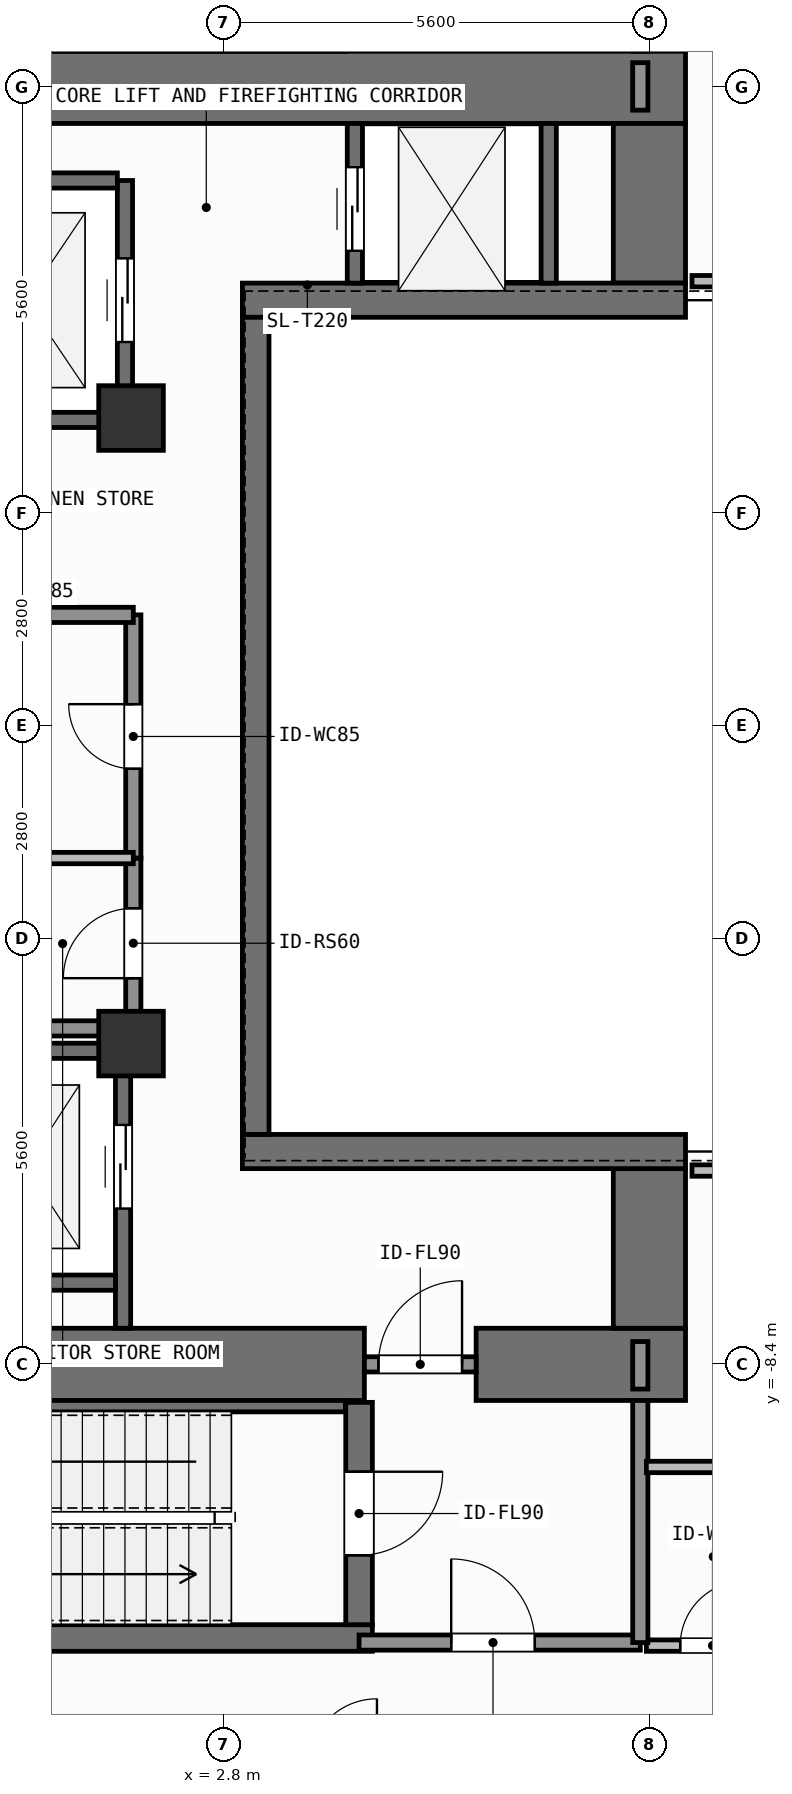
"""IFC4 building model, lengths in metres.
Left out: names, types, materials, properties, quantities, classifications, styles, units other than length and angle.
Written with IfcOpenShell. Run it as: python <this file> out.ifc"""

import sys

from ifc_helpers import new_model, si_unit, direction, frame, frame_2d, origin, origin_2d, place, context, subcontext, project, spatial, rectangle, extrude, element, fill, save


model = new_model("IFC4")
c1 = context("Model", 3, precision=1e-05, world=origin(), true_north=direction((0.0, 1.0)))
c2 = subcontext(c1, "Body", "Model", "MODEL_VIEW")
j1 = project(units=[si_unit("LENGTHUNIT", "METRE"), si_unit("PLANEANGLEUNIT", "RADIAN")], contexts=[c1])
p1 = place(None, origin())
s1 = spatial("IfcSite", under=j1, at=p1, CompositionType="ELEMENT")
p2 = place(p1, origin())
s2 = spatial("IfcBuilding", under=s1, at=p2, CompositionType="ELEMENT")
p3 = place(p2, frame((0.0, 0.0, 125.1)))
s3 = spatial("IfcBuildingStorey", under=s2, at=p3, CompositionType="ELEMENT", Elevation=125.1)
p4 = place(p3, frame((-2.62, -8.4, 0.0), z_axis=(0.0, 0.0, 1.0), x_axis=(1.0, 0.0, 0.0)))
e1 = element("IfcWall", 1, at=p4, inside=s3, PredefinedType="SHEAR", context=c2, shape_type="SweptSolid", body=[
    extrude(rectangle(XDim=7.27, YDim=0.95, at=frame_2d((3.635, 0.0))), origin(), (0.0, 0.0, 1.0), 3.9),
])
p5 = place(p3, frame((6.12, -8.4, 0.0), z_axis=(0.0, 0.0, 1.0), x_axis=(1.0, 0.0, 0.0)))
e2 = element("IfcWall", 2, at=p5, inside=s3, PredefinedType="SHEAR", context=c2, shape_type="SweptSolid", body=[
    extrude(rectangle(XDim=2.755, YDim=0.95, at=frame_2d((1.377, 0.0))), origin(), (0.0, 0.0, 1.0), 3.9),
])
p6 = place(p3, frame((-7.55, 8.4, 0.0), z_axis=(0.0, 0.0, 1.0), x_axis=(1.0, 0.0, 0.0)))
e3 = element("IfcWall", 3, at=p6, inside=s3, PredefinedType="SHEAR", context=c2, shape_type="SweptSolid", body=[
    extrude(rectangle(XDim=16.425, YDim=0.95, at=frame_2d((8.212, 0.0))), origin(), (0.0, 0.0, 1.0), 3.9),
])
for number, where, z_axis, x_axis in (
    (4, (8.4, -7.925, 0.0), (0.0, 0.0, 1.0), (0.0, 1.0, 0.0)),
    (5, (8.4, 5.825, 0.0), (0.0, 0.0, 1.0), (0.0, 1.0, 0.0)),
):
    element("IfcWall", number, at=place(p3, frame(where, z_axis=z_axis, x_axis=x_axis)), inside=s3, PredefinedType="SHEAR", context=c2, shape_type="SweptSolid", body=[
        extrude(rectangle(XDim=2.1, YDim=0.95, at=frame_2d((1.05, 0.0))), origin(), (0.0, 0.0, 1.0), 3.9),
    ])
for number, where, z_axis, x_axis in (
    (6, (3.045, -5.6, 0.0), (0.0, 0.0, 1.0), (1.0, 0.0, 0.0)),
    (7, (3.045, 5.6, 0.0), (0.0, 0.0, 1.0), (1.0, 0.0, 0.0)),
):
    element("IfcWall", number, at=place(p3, frame(where, z_axis=z_axis, x_axis=x_axis)), inside=s3, PredefinedType="SHEAR", context=c2, shape_type="SweptSolid", body=[
        extrude(rectangle(XDim=5.83, YDim=0.45, at=frame_2d((2.915, 0.0))), origin(), (0.0, 0.0, 1.0), 3.9),
    ])
p7 = place(p3, frame((3.22, -5.375, 0.0), z_axis=(0.0, 0.0, 1.0), x_axis=(0.0, 1.0, 0.0)))
e8 = element("IfcWall", 8, at=p7, inside=s3, PredefinedType="SHEAR", context=c2, shape_type="SweptSolid", body=[
    extrude(rectangle(XDim=10.75, YDim=0.35, at=frame_2d((5.375, 0.0))), origin(), (0.0, 0.0, 1.0), 3.9),
])
p8 = place(p3, frame((-2.555, -12.0, 0.0), z_axis=(0.0, 0.0, 1.0), x_axis=(1.0, 0.0, 0.0)))
e9 = element("IfcWall", 9, at=p8, inside=s3, PredefinedType="SHEAR", context=c2, shape_type="SweptSolid", body=[
    extrude(rectangle(XDim=7.31, YDim=0.35, at=frame_2d((3.655, 0.0))), origin(), (0.0, 0.0, 1.0), 3.9),
])
p9 = place(p3, frame((-2.2, -8.95, 0.0), z_axis=(0.0, 0.0, 1.0), x_axis=(1.0, 0.0, 0.0)))
e10 = element("IfcWall", 10, at=p9, inside=s3, PredefinedType="SHEAR", context=c2, shape_type="SweptSolid", body=[
    extrude(rectangle(XDim=6.6, YDim=0.15, at=frame_2d((3.3, 0.0))), origin(), (0.0, 0.0, 1.0), 3.9),
])
p10 = place(p3, frame((4.58, -8.9, 0.0), z_axis=(0.0, 0.0, 1.0), x_axis=(0.0, -1.0, 0.0)))
e11 = element("IfcWall", 11, at=p10, inside=s3, PredefinedType="SHEAR", context=c2, shape_type="SweptSolid", body=[
    extrude(rectangle(XDim=2.925, YDim=0.35, at=frame_2d((1.462, 0.0))), origin(), (0.0, 0.0, 1.0), 3.9),
])
p11 = place(p10, frame((0.913, 0.0, 0.0)))
e12 = element("IfcOpeningElement", 12, at=p11, cuts=e11, PredefinedType="OPENING", context=c2, shape_type="SweptSolid", body=[
    extrude(rectangle(XDim=1.1, YDim=2.15, at=frame_2d((0.55, 1.075))), frame((0.0, 0.185, 0.0), z_axis=(0.0, -1.0, 0.0), x_axis=(1.0, 0.0, 0.0)), (0.0, 0.0, 1.0), 0.37),
])
for number, where, z_axis, x_axis in (
    (13, (1.58, -4.18, 0.0), (0.0, 0.0, 1.0), (1.0, 0.0, 0.0)),
    (14, (1.58, 4.05, 0.0), (0.0, 0.0, 1.0), (1.0, 0.0, 0.0)),
):
    element("IfcColumn", number, at=place(p3, frame(where, z_axis=z_axis, x_axis=x_axis)), inside=s3, PredefinedType="COLUMN", context=c2, shape_type="SweptSolid", body=[
        extrude(rectangle(XDim=0.85, YDim=0.85, at=origin_2d()), origin(), (0.0, 0.0, 1.0), 3.9),
    ])
p12 = place(p3, frame((1.5, 4.025, 0.0), z_axis=(0.0, 0.0, 1.0), x_axis=(0.0, 1.0, 0.0)))
e15 = element("IfcWall", 15, at=p12, inside=s3, PredefinedType="SHEAR", context=c2, shape_type="SweptSolid", body=[
    extrude(rectangle(XDim=3.15, YDim=0.2, at=frame_2d((1.575, 0.0))), origin(), (0.0, 0.0, 1.0), 3.68),
])
p13 = place(p12, frame((1.025, 0.0, 0.0)))
e16 = element("IfcOpeningElement", 16, at=p13, cuts=e15, PredefinedType="OPENING", context=c2, shape_type="SweptSolid", body=[
    extrude(rectangle(XDim=1.1, YDim=2.2, at=frame_2d((0.55, 1.1))), frame((0.0, 0.11, 0.0), z_axis=(0.0, -1.0, 0.0), x_axis=(1.0, 0.0, 0.0)), (0.0, 0.0, 1.0), 0.22),
])
for number, where, z_axis, x_axis in (
    (17, (-1.0, 4.025, 0.0), (0.0, 0.0, 1.0), (1.0, 0.0, 0.0)),
    (18, (-1.0, 7.175, 0.0), (0.0, 0.0, 1.0), (1.0, 0.0, 0.0)),
):
    element("IfcWall", number, at=place(p3, frame(where, z_axis=z_axis, x_axis=x_axis)), inside=s3, PredefinedType="SHEAR", context=c2, shape_type="SweptSolid", body=[
        extrude(rectangle(XDim=2.4, YDim=0.2, at=frame_2d((1.2, 0.0))), origin(), (0.0, 0.0, 1.0), 3.68),
    ])
p14 = place(p3, frame((1.475, -7.925, 0.0), z_axis=(0.0, 0.0, 1.0), x_axis=(0.0, 1.0, 0.0)))
e19 = element("IfcWall", 19, at=p14, inside=s3, PredefinedType="SHEAR", context=c2, shape_type="SweptSolid", body=[
    extrude(rectangle(XDim=3.65, YDim=0.2, at=frame_2d((1.825, 0.0))), origin(), (0.0, 0.0, 1.0), 3.68),
])
p15 = place(p14, frame((1.575, 0.0, 0.0)))
e20 = element("IfcOpeningElement", 20, at=p15, cuts=e19, PredefinedType="OPENING", context=c2, shape_type="SweptSolid", body=[
    extrude(rectangle(XDim=1.1, YDim=2.2, at=frame_2d((0.55, 1.1))), frame((0.0, 0.11, 0.0), z_axis=(0.0, -1.0, 0.0), x_axis=(1.0, 0.0, 0.0)), (0.0, 0.0, 1.0), 0.22),
])
for number, where, z_axis, x_axis in (
    (21, (-0.975, -7.325, 0.0), (0.0, 0.0, 1.0), (1.0, 0.0, 0.0)),
    (22, (-0.975, -4.275, 0.0), (0.0, 0.0, 1.0), (1.0, 0.0, 0.0)),
):
    element("IfcWall", number, at=place(p3, frame(where, z_axis=z_axis, x_axis=x_axis)), inside=s3, PredefinedType="SHEAR", context=c2, shape_type="SweptSolid", body=[
        extrude(rectangle(XDim=2.35, YDim=0.2, at=frame_2d((1.175, 0.0))), origin(), (0.0, 0.0, 1.0), 3.68),
    ])
p16 = place(p3, frame((4.525, 5.825, 0.0), z_axis=(0.0, 0.0, 1.0), x_axis=(0.0, 1.0, 0.0)))
e23 = element("IfcWall", 23, at=p16, inside=s3, PredefinedType="SHEAR", context=c2, shape_type="SweptSolid", body=[
    extrude(rectangle(XDim=2.1, YDim=0.2, at=frame_2d((1.05, 0.0))), origin(), (0.0, 0.0, 1.0), 3.68),
])
p17 = place(p16, frame((0.425, 0.0, 0.0)))
e24 = element("IfcOpeningElement", 24, at=p17, cuts=e23, PredefinedType="OPENING", context=c2, shape_type="SweptSolid", body=[
    extrude(rectangle(XDim=1.1, YDim=2.2, at=frame_2d((0.55, 1.1))), frame((0.0, 0.11, 0.0), z_axis=(0.0, -1.0, 0.0), x_axis=(1.0, 0.0, 0.0)), (0.0, 0.0, 1.0), 0.22),
])
p18 = place(p3, frame((7.075, 5.825, 0.0), z_axis=(0.0, 0.0, 1.0), x_axis=(0.0, 1.0, 0.0)))
e25 = element("IfcWall", 25, at=p18, inside=s3, PredefinedType="SHEAR", context=c2, shape_type="SweptSolid", body=[
    extrude(rectangle(XDim=2.1, YDim=0.2, at=frame_2d((1.05, 0.0))), origin(), (0.0, 0.0, 1.0), 3.68),
])
p19 = place(p3, frame((4.58, -12.06, 0.0), z_axis=(0.0, 0.0, 1.0), x_axis=(1.0, 0.0, 0.0)))
e26 = element("IfcWall", 26, at=p19, inside=s3, PredefinedType="SOLIDWALL", context=c2, shape_type="SweptSolid", body=[
    extrude(rectangle(XDim=3.7, YDim=0.2, at=frame_2d((1.85, 0.0))), origin(), (0.0, 0.0, 1.0), 3.68),
])
p20 = place(p19, frame((1.212, 0.0, 0.0)))
e27 = element("IfcOpeningElement", 27, at=p20, cuts=e26, PredefinedType="OPENING", context=c2, shape_type="SweptSolid", body=[
    extrude(rectangle(XDim=1.1, YDim=2.15, at=frame_2d((0.55, 1.075))), frame((0.0, 0.11, 0.0), z_axis=(0.0, -1.0, 0.0), x_axis=(1.0, 0.0, 0.0)), (0.0, 0.0, 1.0), 0.22),
])
p21 = place(p3, frame((4.65, -8.4, 0.0), z_axis=(0.0, 0.0, 1.0), x_axis=(1.0, 0.0, 0.0)))
e28 = element("IfcWall", 28, at=p21, inside=s3, PredefinedType="SOLIDWALL", context=c2, shape_type="SweptSolid", body=[
    extrude(rectangle(XDim=1.47, YDim=0.2, at=frame_2d((0.735, 0.0))), origin(), (0.0, 0.0, 1.0), 2.72),
])
p22 = place(p21, frame((0.185, 0.0, 0.0)))
e29 = element("IfcOpeningElement", 29, at=p22, cuts=e28, PredefinedType="OPENING", context=c2, shape_type="SweptSolid", body=[
    extrude(rectangle(XDim=1.1, YDim=2.15, at=frame_2d((0.55, 1.075))), frame((0.0, 0.11, 0.0), z_axis=(0.0, -1.0, 0.0), x_axis=(1.0, 0.0, 0.0)), (0.0, 0.0, 1.0), 0.22),
])
p23 = place(p3, frame((1.61, -3.98, 0.0), z_axis=(0.0, 0.0, 1.0), x_axis=(0.0, 1.0, 0.0)))
e30 = element("IfcWall", 30, at=p23, inside=s3, PredefinedType="SOLIDWALL", context=c2, shape_type="SweptSolid", body=[
    extrude(rectangle(XDim=2.241, YDim=0.2, at=frame_2d((1.121, 0.0))), origin(), (0.0, 0.0, 1.0), 3.68),
])
p24 = place(p23, frame((0.66, 0.0, 0.0)))
e31 = element("IfcOpeningElement", 31, at=p24, cuts=e30, PredefinedType="OPENING", context=c2, shape_type="SweptSolid", body=[
    extrude(rectangle(XDim=0.92, YDim=2.1, at=frame_2d((0.46, 1.05))), frame((0.0, 0.11, 0.0), z_axis=(0.0, -1.0, 0.0), x_axis=(1.0, 0.0, 0.0)), (0.0, 0.0, 1.0), 0.22),
])
p25 = place(p3, frame((1.61, -1.739, 0.0), z_axis=(0.0, 0.0, 1.0), x_axis=(0.0, 1.0, 0.0)))
e32 = element("IfcWall", 32, at=p25, inside=s3, PredefinedType="SOLIDWALL", context=c2, shape_type="SweptSolid", body=[
    extrude(rectangle(XDim=3.199, YDim=0.2, at=frame_2d((1.6, 0.0))), origin(), (0.0, 0.0, 1.0), 3.68),
])
p26 = place(p25, frame((1.175, 0.0, 0.0)))
e33 = element("IfcOpeningElement", 33, at=p26, cuts=e32, PredefinedType="OPENING", context=c2, shape_type="SweptSolid", body=[
    extrude(rectangle(XDim=0.85, YDim=2.1, at=frame_2d((0.425, 1.05))), frame((0.0, 0.11, 0.0), z_axis=(0.0, -1.0, 0.0), x_axis=(1.0, 0.0, 0.0)), (0.0, 0.0, 1.0), 0.22),
])
p27 = place(p3, frame((8.36, -12.1, 0.0), z_axis=(0.0, 0.0, 1.0), x_axis=(1.0, 0.0, 0.0)))
e34 = element("IfcWall", 34, at=p27, inside=s3, PredefinedType="PARTITIONING", context=c2, shape_type="SweptSolid", body=[
    extrude(rectangle(XDim=1.74, YDim=0.15, at=frame_2d((0.87, 0.0))), origin(), (0.0, 0.0, 1.0), 3.68),
])
p28 = place(p27, frame((0.445, 0.0, 0.0)))
e35 = element("IfcOpeningElement", 35, at=p28, cuts=e34, PredefinedType="OPENING", context=c2, shape_type="SweptSolid", body=[
    extrude(rectangle(XDim=0.85, YDim=2.1, at=frame_2d((0.425, 1.05))), frame((0.0, 0.085, 0.0), z_axis=(0.0, -1.0, 0.0), x_axis=(1.0, 0.0, 0.0)), (0.0, 0.0, 1.0), 0.17),
])
p29 = place(p3, frame((8.28, -12.06, 0.0), z_axis=(0.0, 0.0, 1.0), x_axis=(0.0, 1.0, 0.0)))
e36 = element("IfcWall", 36, at=p29, inside=s3, PredefinedType="SOLIDWALL", context=c2, shape_type="SweptSolid", body=[
    extrude(rectangle(XDim=3.185, YDim=0.2, at=frame_2d((1.593, 0.0))), origin(), (0.0, 0.0, 1.0), 3.68),
])
for number, where, z_axis, x_axis in (
    (37, (-1.58, -3.98, 0.0), (0.0, 0.0, 1.0), (1.0, 0.0, 0.0)),
    (38, (-1.58, 1.46, 0.0), (0.0, 0.0, 1.0), (1.0, 0.0, 0.0)),
):
    element("IfcWall", number, at=place(p3, frame(where, z_axis=z_axis, x_axis=x_axis)), inside=s3, PredefinedType="SOLIDWALL", context=c2, shape_type="SweptSolid", body=[
        extrude(rectangle(XDim=3.19, YDim=0.2, at=frame_2d((1.595, 0.0))), origin(), (0.0, 0.0, 1.0), 3.68),
    ])
p30 = place(p3, frame((-1.58, -1.739, 0.0), z_axis=(0.0, 0.0, 1.0), x_axis=(1.0, 0.0, 0.0)))
e39 = element("IfcWall", 39, at=p30, inside=s3, PredefinedType="PARTITIONING", context=c2, shape_type="SweptSolid", body=[
    extrude(rectangle(XDim=3.19, YDim=0.15, at=frame_2d((1.595, 0.0))), origin(), (0.0, 0.0, 1.0), 3.68),
])
p31 = place(p3, frame((8.28, -8.725, 0.0), z_axis=(0.0, 0.0, 1.0), x_axis=(0.0, 1.0, 0.0)))
e40 = element("IfcWall", 40, at=p31, inside=s3, PredefinedType="SOLIDWALL", context=c2, shape_type="SweptSolid", body=[
    extrude(rectangle(XDim=0.625, YDim=0.2, at=frame_2d((0.312, 0.0))), origin(), (0.0, 0.0, 1.0), 3.68),
])
p32 = place(p3, frame((8.36, -9.75, 0.0), z_axis=(0.0, 0.0, 1.0), x_axis=(1.0, 0.0, 0.0)))
e41 = element("IfcWall", 41, at=p32, inside=s3, PredefinedType="PARTITIONING", context=c2, shape_type="SweptSolid", body=[
    extrude(rectangle(XDim=1.74, YDim=0.15, at=frame_2d((0.87, 0.0))), origin(), (0.0, 0.0, 1.0), 3.68),
])
p33 = place(p3, frame((8.96, -5.85, 0.0), z_axis=(0.0, 0.0, 1.0), x_axis=(1.0, 0.0, 0.0)))
e42 = element("IfcWall", 42, at=p33, inside=s3, PredefinedType="PARTITIONING", context=c2, shape_type="SweptSolid", body=[
    extrude(rectangle(XDim=6.62, YDim=0.15, at=frame_2d((3.31, 0.0))), origin(), (0.0, 0.0, 1.0), 3.68),
])
p34 = place(p3, frame((8.28, 8.1, 0.0), z_axis=(0.0, 0.0, 1.0), x_axis=(0.0, 1.0, 0.0)))
e43 = element("IfcWall", 43, at=p34, inside=s3, PredefinedType="SOLIDWALL", context=c2, shape_type="SweptSolid", body=[
    extrude(rectangle(XDim=0.625, YDim=0.2, at=frame_2d((0.312, 0.0))), origin(), (0.0, 0.0, 1.0), 3.68),
])
p35 = place(p3, frame((8.96, 5.85, 0.0), z_axis=(0.0, 0.0, 1.0), x_axis=(1.0, 0.0, 0.0)))
e44 = element("IfcWall", 44, at=p35, inside=s3, PredefinedType="PARTITIONING", context=c2, shape_type="SweptSolid", body=[
    extrude(rectangle(XDim=6.62, YDim=0.15, at=frame_2d((3.31, 0.0))), origin(), (0.0, 0.0, 1.0), 3.68),
])
p36 = place(p13, origin())
e45 = element("IfcDoor", 45, at=p36, inside=s3, OperationType="SLIDING_TO_LEFT", PredefinedType="DOOR", context=c2, shape_type="SweptSolid", body=[
    extrude(rectangle(XDim=1.1, YDim=2.2, at=frame_2d((0.55, 1.1))), frame((0.0, 0.025, 0.0), z_axis=(0.0, -1.0, 0.0), x_axis=(1.0, 0.0, 0.0)), (0.0, 0.0, 1.0), 0.05),
])
fill(e16, e45)
p37 = place(p15, origin())
e46 = element("IfcDoor", 46, at=p37, inside=s3, OperationType="SLIDING_TO_LEFT", PredefinedType="DOOR", context=c2, shape_type="SweptSolid", body=[
    extrude(rectangle(XDim=1.1, YDim=2.2, at=frame_2d((0.55, 1.1))), frame((0.0, 0.025, 0.0), z_axis=(0.0, -1.0, 0.0), x_axis=(1.0, 0.0, 0.0)), (0.0, 0.0, 1.0), 0.05),
])
fill(e20, e46)
p38 = place(p17, origin())
e47 = element("IfcDoor", 47, at=p38, inside=s3, OperationType="SLIDING_TO_LEFT", PredefinedType="DOOR", context=c2, shape_type="SweptSolid", body=[
    extrude(rectangle(XDim=1.1, YDim=2.2, at=frame_2d((0.55, 1.1))), frame((0.0, 0.025, 0.0), z_axis=(0.0, -1.0, 0.0), x_axis=(1.0, 0.0, 0.0)), (0.0, 0.0, 1.0), 0.05),
])
fill(e24, e47)
p39 = place(p11, origin())
e48 = element("IfcDoor", 48, at=p39, inside=s3, OperationType="SINGLE_SWING_LEFT", PredefinedType="DOOR", context=c2, shape_type="SweptSolid", body=[
    extrude(rectangle(XDim=1.1, YDim=2.15, at=frame_2d((0.55, 1.075))), frame((0.0, 0.025, 0.0), z_axis=(0.0, -1.0, 0.0), x_axis=(1.0, 0.0, 0.0)), (0.0, 0.0, 1.0), 0.05),
])
fill(e12, e48)
p40 = place(p20, origin())
e49 = element("IfcDoor", 49, at=p40, inside=s3, OperationType="SINGLE_SWING_LEFT", PredefinedType="DOOR", context=c2, shape_type="SweptSolid", body=[
    extrude(rectangle(XDim=1.1, YDim=2.15, at=frame_2d((0.55, 1.075))), frame((0.0, 0.025, 0.0), z_axis=(0.0, -1.0, 0.0), x_axis=(1.0, 0.0, 0.0)), (0.0, 0.0, 1.0), 0.05),
])
fill(e27, e49)
p41 = place(p22, origin())
e50 = element("IfcDoor", 50, at=p41, inside=s3, OperationType="SINGLE_SWING_RIGHT", PredefinedType="DOOR", context=c2, shape_type="SweptSolid", body=[
    extrude(rectangle(XDim=1.1, YDim=2.15, at=frame_2d((0.55, 1.075))), frame((0.0, 0.025, 0.0), z_axis=(0.0, -1.0, 0.0), x_axis=(1.0, 0.0, 0.0)), (0.0, 0.0, 1.0), 0.05),
])
fill(e29, e50)
p42 = place(p24, origin())
e51 = element("IfcDoor", 51, at=p42, inside=s3, OperationType="SINGLE_SWING_LEFT", PredefinedType="DOOR", context=c2, shape_type="SweptSolid", body=[
    extrude(rectangle(XDim=0.92, YDim=2.1, at=frame_2d((0.46, 1.05))), frame((0.0, 0.025, 0.0), z_axis=(0.0, -1.0, 0.0), x_axis=(1.0, 0.0, 0.0)), (0.0, 0.0, 1.0), 0.05),
])
fill(e31, e51)
p43 = place(p26, origin())
e52 = element("IfcDoor", 52, at=p43, inside=s3, OperationType="SINGLE_SWING_RIGHT", PredefinedType="DOOR", context=c2, shape_type="SweptSolid", body=[
    extrude(rectangle(XDim=0.85, YDim=2.1, at=frame_2d((0.425, 1.05))), frame((0.0, 0.025, 0.0), z_axis=(0.0, -1.0, 0.0), x_axis=(1.0, 0.0, 0.0)), (0.0, 0.0, 1.0), 0.05),
])
fill(e33, e52)
p44 = place(p28, origin())
e53 = element("IfcDoor", 53, at=p44, inside=s3, OperationType="SINGLE_SWING_RIGHT", PredefinedType="DOOR", context=c2, shape_type="SweptSolid", body=[
    extrude(rectangle(XDim=0.85, YDim=2.1, at=frame_2d((0.425, 1.05))), frame((0.0, 0.025, 0.0), z_axis=(0.0, -1.0, 0.0), x_axis=(1.0, 0.0, 0.0)), (0.0, 0.0, 1.0), 0.05),
])
fill(e35, e53)
save(model, sys.argv[1])
